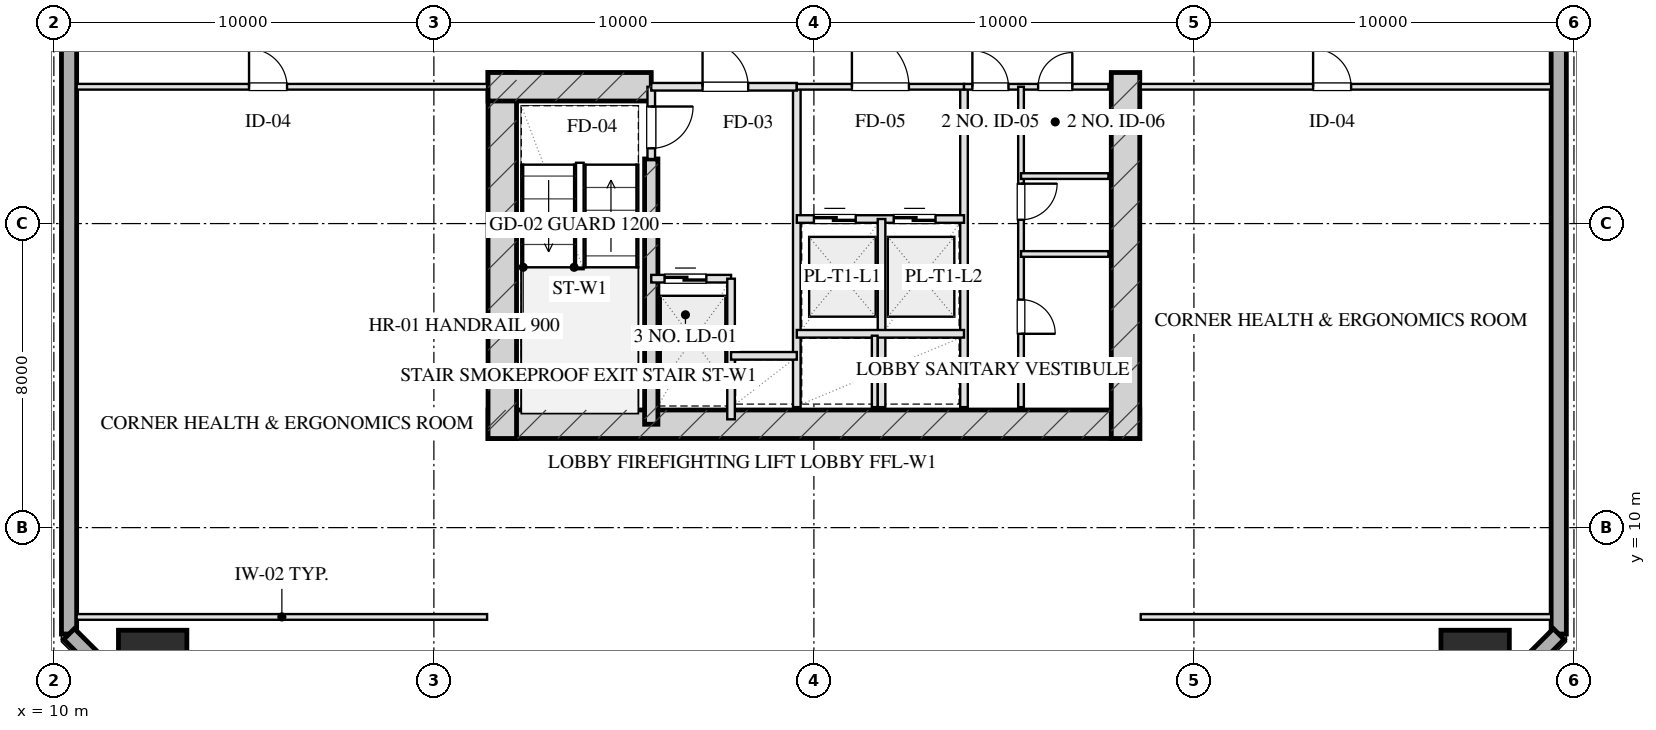
"""IFC4 building model, lengths in metres.
Left out: names, types, materials, properties, quantities, classifications, styles, units other than length and angle.
Written with IfcOpenShell. Run it as: python <this file> out.ifc"""

import sys

from ifc_helpers import new_model, si_unit, direction, frame, frame_2d, origin, origin_2d, place, context, subcontext, project, spatial, rectangle, hollow_rectangle, extrude, element, fill, save


model = new_model("IFC4")
c1 = context("Model", 3, precision=1e-05, world=origin(), true_north=direction((0.0, 1.0)))
c2 = subcontext(c1, "Body", "Model", "MODEL_VIEW")
j1 = project(units=[si_unit("LENGTHUNIT", "METRE"), si_unit("PLANEANGLEUNIT", "RADIAN")], contexts=[c1])
p1 = place(None, origin())
s1 = spatial("IfcSite", under=j1, at=p1, CompositionType="ELEMENT")
p2 = place(p1, origin())
s2 = spatial("IfcBuilding", under=s1, at=p2, CompositionType="ELEMENT")
p3 = place(p2, frame((0.0, 0.0, 85.1)))
s3 = spatial("IfcBuildingStorey", under=s2, at=p3, CompositionType="ELEMENT", Elevation=85.1)
p4 = place(p3, frame((21.425, 12.72, 0.0), z_axis=(0.0, 0.0, 1.0), x_axis=(1.0, 0.0, 0.0)))
e1 = element("IfcWall", 1, at=p4, inside=s3, PredefinedType="SHEAR", context=c2, shape_type="SweptSolid", body=[
    extrude(rectangle(XDim=17.15, YDim=0.75, at=frame_2d((8.575, 0.0))), origin(), (0.0, 0.0, 1.0), 3.45),
])
for number, where, z_axis, x_axis in (
    (2, (21.8, 21.975, 0.0), (0.0, 0.0, 1.0), (0.0, -1.0, 0.0)),
    (3, (38.2, 21.975, 0.0), (0.0, 0.0, 1.0), (0.0, -1.0, 0.0)),
):
    element("IfcWall", number, at=place(p3, frame(where, z_axis=z_axis, x_axis=x_axis)), inside=s3, PredefinedType="SHEAR", context=c2, shape_type="SweptSolid", body=[
        extrude(rectangle(XDim=9.63, YDim=0.75, at=frame_2d((4.815, 0.0))), origin(), (0.0, 0.0, 1.0), 3.45),
    ])
p5 = place(p3, frame((25.72, 19.7, 0.0), z_axis=(0.0, 0.0, 1.0), x_axis=(0.0, -1.0, 0.0)))
e4 = element("IfcWall", 4, at=p5, inside=s3, PredefinedType="SHEAR", context=c2, shape_type="SweptSolid", body=[
    extrude(rectangle(XDim=6.98, YDim=0.35, at=frame_2d((3.49, 0.0))), origin(), (0.0, 0.0, 1.0), 3.45),
])
p6 = place(p3, frame((21.425, 21.6, 0.0), z_axis=(0.0, 0.0, 1.0), x_axis=(1.0, 0.0, 0.0)))
e5 = element("IfcWall", 5, at=p6, inside=s3, PredefinedType="SHEAR", context=c2, shape_type="SweptSolid", body=[
    extrude(rectangle(XDim=4.295, YDim=0.75, at=frame_2d((2.147, 0.0))), origin(), (0.0, 0.0, 1.0), 3.45),
])
for number, where, z_axis, x_axis in (
    (6, (12.6, 6.4, 0.0), (0.0, 0.0, 1.0), (1.0, 0.0, 0.0)),
    (7, (47.4, 6.4, 0.0), (0.0, 0.0, 1.0), (1.0, 0.0, 0.0)),
):
    element("IfcColumn", number, at=place(p3, frame(where, z_axis=z_axis, x_axis=x_axis)), inside=s3, PredefinedType="COLUMN", context=c2, shape_type="SweptSolid", body=[
        extrude(hollow_rectangle(XDim=1.8, YDim=1.8, WallThickness=0.06, at=origin_2d()), origin(), (0.0, 0.0, 1.0), 3.451),
    ])
p7 = place(p3, frame((10.4, 7.2, 0.0), z_axis=(0.0, 0.0, 1.0), x_axis=(0.0, 1.0, 0.0)))
e8 = element("IfcWall", 8, at=p7, inside=s3, PredefinedType="SOLIDWALL", context=c2, shape_type="SweptSolid", body=[
    extrude(rectangle(XDim=53.6, YDim=0.4, at=frame_2d((26.8, 0.0))), origin(), (0.0, 0.0, 1.0), 2.61),
])
p8 = place(p3, frame((49.6, 60.8, 0.0), z_axis=(0.0, 0.0, 1.0), x_axis=(0.0, -1.0, 0.0)))
e9 = element("IfcWall", 9, at=p8, inside=s3, PredefinedType="SOLIDWALL", context=c2, shape_type="SweptSolid", body=[
    extrude(rectangle(XDim=53.6, YDim=0.4, at=frame_2d((26.8, 0.0))), origin(), (0.0, 0.0, 1.0), 2.61),
])
p9 = place(p8, frame((32.0, 0.0, 0.75)))
e10 = element("IfcOpeningElement", 10, at=p9, cuts=e9, PredefinedType="OPENING", context=c2, shape_type="SweptSolid", body=[
    extrude(rectangle(XDim=2.4, YDim=1.46, at=frame_2d((1.2, 0.73))), frame((0.0, 0.21, 0.0), z_axis=(0.0, -1.0, 0.0), x_axis=(1.0, 0.0, 0.0)), (0.0, 0.0, 1.0), 0.42),
])
p10 = place(p8, frame((23.0, 0.0, 0.75)))
e11 = element("IfcOpeningElement", 11, at=p10, cuts=e9, PredefinedType="OPENING", context=c2, shape_type="SweptSolid", body=[
    extrude(rectangle(XDim=2.4, YDim=1.46, at=frame_2d((1.2, 0.73))), frame((0.0, 0.21, 0.0), z_axis=(0.0, -1.0, 0.0), x_axis=(1.0, 0.0, 0.0)), (0.0, 0.0, 1.0), 0.42),
])
for number, where, z_axis, x_axis in (
    (12, (49.6, 7.2, 0.0), (0.0, 0.0, 1.0), (-0.707, -0.707, 0.0)),
    (13, (13.4, 4.2, 0.0), (0.0, 0.0, 1.0), (-0.707, 0.707, 0.0)),
):
    element("IfcWall", number, at=place(p3, frame(where, z_axis=z_axis, x_axis=x_axis)), inside=s3, PredefinedType="SOLIDWALL", context=c2, shape_type="SweptSolid", body=[
        extrude(rectangle(XDim=4.243, YDim=0.4, at=frame_2d((2.121, 0.0))), origin(), (0.0, 0.0, 1.0), 2.61),
    ])
p11 = place(p3, frame((25.72, 21.6, 0.0), z_axis=(0.0, 0.0, 1.0), x_axis=(0.0, -1.0, 0.0)))
e14 = element("IfcWall", 14, at=p11, inside=s3, PredefinedType="PARTITIONING", context=c2, shape_type="SweptSolid", body=[
    extrude(rectangle(XDim=1.9, YDim=0.2, at=frame_2d((0.95, 0.0))), origin(), (0.0, 0.0, 1.0), 3.175),
])
p12 = place(p11, frame((0.52, 0.0, 0.0)))
e15 = element("IfcOpeningElement", 15, at=p12, cuts=e14, PredefinedType="OPENING", context=c2, shape_type="SweptSolid", body=[
    extrude(rectangle(XDim=1.1, YDim=2.05, at=frame_2d((0.55, 1.025))), frame((0.0, 0.11, 0.0), z_axis=(0.0, -1.0, 0.0), x_axis=(1.0, 0.0, 0.0)), (0.0, 0.0, 1.0), 0.22),
])
p13 = place(p3, frame((29.55, 21.6, 0.0), z_axis=(0.0, 0.0, 1.0), x_axis=(0.0, -1.0, 0.0)))
e16 = element("IfcWall", 16, at=p13, inside=s3, PredefinedType="PARTITIONING", context=c2, shape_type="SweptSolid", body=[
    extrude(rectangle(XDim=8.43, YDim=0.2, at=frame_2d((4.215, 0.0))), origin(), (0.0, 0.0, 1.0), 3.175),
])
p14 = place(p3, frame((25.72, 21.6, 0.0), z_axis=(0.0, 0.0, 1.0), x_axis=(1.0, 0.0, 0.0)))
e17 = element("IfcWall", 17, at=p14, inside=s3, PredefinedType="PARTITIONING", context=c2, shape_type="SweptSolid", body=[
    extrude(rectangle(XDim=3.83, YDim=0.2, at=frame_2d((1.915, 0.0))), origin(), (0.0, 0.0, 1.0), 3.175),
])
p15 = place(p14, frame((1.35, 0.0, 0.0)))
e18 = element("IfcOpeningElement", 18, at=p15, cuts=e17, PredefinedType="OPENING", context=c2, shape_type="SweptSolid", body=[
    extrude(rectangle(XDim=1.2, YDim=2.05, at=frame_2d((0.6, 1.025))), frame((0.0, 0.11, 0.0), z_axis=(0.0, -1.0, 0.0), x_axis=(1.0, 0.0, 0.0)), (0.0, 0.0, 1.0), 0.22),
])
p16 = place(p3, frame((25.72, 16.55, 0.0), z_axis=(0.0, 0.0, 1.0), x_axis=(1.0, 0.0, 0.0)))
e19 = element("IfcWall", 19, at=p16, inside=s3, PredefinedType="PARTITIONING", context=c2, shape_type="SweptSolid", body=[
    extrude(rectangle(XDim=2.1, YDim=0.2, at=frame_2d((1.05, 0.0))), origin(), (0.0, 0.0, 1.0), 3.175),
])
p17 = place(p16, frame((0.35, 0.0, 0.0)))
e20 = element("IfcOpeningElement", 20, at=p17, cuts=e19, PredefinedType="OPENING", context=c2, shape_type="SweptSolid", body=[
    extrude(rectangle(XDim=1.1, YDim=2.05, at=frame_2d((0.55, 1.025))), frame((0.0, 0.11, 0.0), z_axis=(0.0, -1.0, 0.0), x_axis=(1.0, 0.0, 0.0)), (0.0, 0.0, 1.0), 0.22),
])
p18 = place(p3, frame((27.82, 16.55, 0.0), z_axis=(0.0, 0.0, 1.0), x_axis=(0.0, -1.0, 0.0)))
e21 = element("IfcWall", 21, at=p18, inside=s3, PredefinedType="PARTITIONING", context=c2, shape_type="SweptSolid", body=[
    extrude(rectangle(XDim=3.7, YDim=0.2, at=frame_2d((1.85, 0.0))), origin(), (0.0, 0.0, 1.0), 3.175),
])
p19 = place(p3, frame((27.82, 14.52, 0.0), z_axis=(0.0, 0.0, 1.0), x_axis=(1.0, 0.0, 0.0)))
e22 = element("IfcWall", 22, at=p19, inside=s3, PredefinedType="PARTITIONING", context=c2, shape_type="SweptSolid", body=[
    extrude(rectangle(XDim=1.73, YDim=0.2, at=frame_2d((0.865, 0.0))), origin(), (0.0, 0.0, 1.0), 3.175),
])
p20 = place(p3, frame((33.95, 21.6, 0.0), z_axis=(0.0, 0.0, 1.0), x_axis=(0.0, -1.0, 0.0)))
e23 = element("IfcWall", 23, at=p20, inside=s3, PredefinedType="PARTITIONING", context=c2, shape_type="SweptSolid", body=[
    extrude(rectangle(XDim=8.43, YDim=0.2, at=frame_2d((4.215, 0.0))), origin(), (0.0, 0.0, 1.0), 3.175),
])
p21 = place(p3, frame((29.55, 21.6, 0.0), z_axis=(0.0, 0.0, 1.0), x_axis=(1.0, 0.0, 0.0)))
e24 = element("IfcWall", 24, at=p21, inside=s3, PredefinedType="PARTITIONING", context=c2, shape_type="SweptSolid", body=[
    extrude(rectangle(XDim=4.4, YDim=0.15, at=frame_2d((2.2, 0.0))), origin(), (0.0, 0.0, 1.0), 3.175),
])
p22 = place(p21, frame((1.45, 0.0, 0.0)))
e25 = element("IfcOpeningElement", 25, at=p22, cuts=e24, PredefinedType="OPENING", context=c2, shape_type="SweptSolid", body=[
    extrude(rectangle(XDim=1.5, YDim=2.05, at=frame_2d((0.75, 1.025))), frame((0.0, 0.085, 0.0), z_axis=(0.0, -1.0, 0.0), x_axis=(1.0, 0.0, 0.0)), (0.0, 0.0, 1.0), 0.17),
])
p23 = place(p3, frame((29.55, 18.12, 0.0), z_axis=(0.0, 0.0, 1.0), x_axis=(1.0, 0.0, 0.0)))
e26 = element("IfcWall", 26, at=p23, inside=s3, PredefinedType="PARTITIONING", context=c2, shape_type="SweptSolid", body=[
    extrude(rectangle(XDim=4.4, YDim=0.2, at=frame_2d((2.2, 0.0))), origin(), (0.0, 0.0, 1.0), 3.175),
])
p24 = place(p23, frame((0.45, 0.0, 0.0)))
e27 = element("IfcOpeningElement", 27, at=p24, cuts=e26, PredefinedType="OPENING", context=c2, shape_type="SweptSolid", body=[
    extrude(rectangle(XDim=1.1, YDim=2.05, at=frame_2d((0.55, 1.025))), frame((0.0, 0.11, 0.0), z_axis=(0.0, -1.0, 0.0), x_axis=(1.0, 0.0, 0.0)), (0.0, 0.0, 1.0), 0.22),
])
p25 = place(p23, frame((2.55, 0.0, 0.0)))
e28 = element("IfcOpeningElement", 28, at=p25, cuts=e26, PredefinedType="OPENING", context=c2, shape_type="SweptSolid", body=[
    extrude(rectangle(XDim=1.1, YDim=2.05, at=frame_2d((0.55, 1.025))), frame((0.0, 0.11, 0.0), z_axis=(0.0, -1.0, 0.0), x_axis=(1.0, 0.0, 0.0)), (0.0, 0.0, 1.0), 0.22),
])
p26 = place(p3, frame((31.78, 18.12, 0.0), z_axis=(0.0, 0.0, 1.0), x_axis=(0.0, -1.0, 0.0)))
e29 = element("IfcWall", 29, at=p26, inside=s3, PredefinedType="PARTITIONING", context=c2, shape_type="SweptSolid", body=[
    extrude(rectangle(XDim=4.95, YDim=0.2, at=frame_2d((2.475, 0.0))), origin(), (0.0, 0.0, 1.0), 3.175),
])
p27 = place(p3, frame((29.55, 15.1, 0.0), z_axis=(0.0, 0.0, 1.0), x_axis=(1.0, 0.0, 0.0)))
e30 = element("IfcWall", 30, at=p27, inside=s3, PredefinedType="PARTITIONING", context=c2, shape_type="SweptSolid", body=[
    extrude(rectangle(XDim=4.4, YDim=0.2, at=frame_2d((2.2, 0.0))), origin(), (0.0, 0.0, 1.0), 3.175),
])
p28 = place(p3, frame((31.6, 15.05, 0.0), z_axis=(0.0, 0.0, 1.0), x_axis=(0.0, -1.0, 0.0)))
e31 = element("IfcWall", 31, at=p28, inside=s3, PredefinedType="PARTITIONING", context=c2, shape_type="SweptSolid", body=[
    extrude(rectangle(XDim=1.88, YDim=0.15, at=frame_2d((0.94, 0.0))), origin(), (0.0, 0.0, 1.0), 3.175),
])
p29 = place(p3, frame((33.95, 21.6, 0.0), z_axis=(0.0, 0.0, 1.0), x_axis=(1.0, 0.0, 0.0)))
e32 = element("IfcWall", 32, at=p29, inside=s3, PredefinedType="PARTITIONING", context=c2, shape_type="SweptSolid", body=[
    extrude(rectangle(XDim=3.8, YDim=0.15, at=frame_2d((1.9, 0.0))), origin(), (0.0, 0.0, 1.0), 3.175),
])
p30 = place(p29, frame((0.22, 0.0, 0.0)))
e33 = element("IfcOpeningElement", 33, at=p30, cuts=e32, PredefinedType="OPENING", context=c2, shape_type="SweptSolid", body=[
    extrude(rectangle(XDim=0.95, YDim=2.05, at=frame_2d((0.475, 1.025))), frame((0.0, 0.085, 0.0), z_axis=(0.0, -1.0, 0.0), x_axis=(1.0, 0.0, 0.0)), (0.0, 0.0, 1.0), 0.17),
])
p31 = place(p29, frame((1.95, 0.0, 0.0)))
e34 = element("IfcOpeningElement", 34, at=p31, cuts=e32, PredefinedType="OPENING", context=c2, shape_type="SweptSolid", body=[
    extrude(rectangle(XDim=0.9, YDim=2.05, at=frame_2d((0.45, 1.025))), frame((0.0, 0.085, 0.0), z_axis=(0.0, -1.0, 0.0), x_axis=(1.0, 0.0, 0.0)), (0.0, 0.0, 1.0), 0.17),
])
p32 = place(p3, frame((35.45, 21.6, 0.0), z_axis=(0.0, 0.0, 1.0), x_axis=(0.0, -1.0, 0.0)))
e35 = element("IfcWall", 35, at=p32, inside=s3, PredefinedType="PARTITIONING", context=c2, shape_type="SweptSolid", body=[
    extrude(rectangle(XDim=8.43, YDim=0.15, at=frame_2d((4.215, 0.0))), origin(), (0.0, 0.0, 1.0), 2.815),
])
p33 = place(p32, frame((2.55, 0.0, 0.0)))
e36 = element("IfcOpeningElement", 36, at=p33, cuts=e35, PredefinedType="OPENING", context=c2, shape_type="SweptSolid", body=[
    extrude(rectangle(XDim=0.95, YDim=2.05, at=frame_2d((0.475, 1.025))), frame((0.0, 0.085, 0.0), z_axis=(0.0, -1.0, 0.0), x_axis=(1.0, 0.0, 0.0)), (0.0, 0.0, 1.0), 0.17),
])
p34 = place(p32, frame((5.6, 0.0, 0.0)))
e37 = element("IfcOpeningElement", 37, at=p34, cuts=e35, PredefinedType="OPENING", context=c2, shape_type="SweptSolid", body=[
    extrude(rectangle(XDim=0.9, YDim=2.05, at=frame_2d((0.45, 1.025))), frame((0.0, 0.085, 0.0), z_axis=(0.0, -1.0, 0.0), x_axis=(1.0, 0.0, 0.0)), (0.0, 0.0, 1.0), 0.17),
])
for number, where, z_axis, x_axis in (
    (38, (35.45, 17.2, 0.0), (0.0, 0.0, 1.0), (1.0, 0.0, 0.0)),
    (39, (35.45, 19.25, 0.0), (0.0, 0.0, 1.0), (1.0, 0.0, 0.0)),
):
    element("IfcWall", number, at=place(p3, frame(where, z_axis=z_axis, x_axis=x_axis)), inside=s3, PredefinedType="PARTITIONING", context=c2, shape_type="SweptSolid", body=[
        extrude(rectangle(XDim=2.3, YDim=0.15, at=frame_2d((1.15, 0.0))), origin(), (0.0, 0.0, 1.0), 3.175),
    ])
p35 = place(p3, frame((10.6, 7.65, 0.0), z_axis=(0.0, 0.0, 1.0), x_axis=(1.0, 0.0, 0.0)))
e40 = element("IfcWall", 40, at=p35, inside=s3, PredefinedType="PARTITIONING", context=c2, shape_type="SweptSolid", body=[
    extrude(rectangle(XDim=10.8, YDim=0.15, at=frame_2d((5.4, 0.0))), origin(), (0.0, 0.0, 1.0), 3.175),
])
p36 = place(p3, frame((10.6, 21.6, 0.0), z_axis=(0.0, 0.0, 1.0), x_axis=(1.0, 0.0, 0.0)))
e41 = element("IfcWall", 41, at=p36, inside=s3, PredefinedType="PARTITIONING", context=c2, shape_type="SweptSolid", body=[
    extrude(rectangle(XDim=10.8, YDim=0.15, at=frame_2d((5.4, 0.0))), origin(), (0.0, 0.0, 1.0), 3.175),
])
p37 = place(p36, frame((4.536, 0.0, 0.0)))
e42 = element("IfcOpeningElement", 42, at=p37, cuts=e41, PredefinedType="OPENING", context=c2, shape_type="SweptSolid", body=[
    extrude(rectangle(XDim=1.0, YDim=2.05, at=frame_2d((0.5, 1.025))), frame((0.0, 0.085, 0.0), z_axis=(0.0, -1.0, 0.0), x_axis=(1.0, 0.0, 0.0)), (0.0, 0.0, 1.0), 0.17),
])
p38 = place(p3, frame((38.6, 7.65, 0.0), z_axis=(0.0, 0.0, 1.0), x_axis=(1.0, 0.0, 0.0)))
e43 = element("IfcWall", 43, at=p38, inside=s3, PredefinedType="PARTITIONING", context=c2, shape_type="SweptSolid", body=[
    extrude(rectangle(XDim=10.8, YDim=0.15, at=frame_2d((5.4, 0.0))), origin(), (0.0, 0.0, 1.0), 3.175),
])
p39 = place(p3, frame((38.6, 21.6, 0.0), z_axis=(0.0, 0.0, 1.0), x_axis=(1.0, 0.0, 0.0)))
e44 = element("IfcWall", 44, at=p39, inside=s3, PredefinedType="PARTITIONING", context=c2, shape_type="SweptSolid", body=[
    extrude(rectangle(XDim=10.8, YDim=0.15, at=frame_2d((5.4, 0.0))), origin(), (0.0, 0.0, 1.0), 3.175),
])
p40 = place(p39, frame((4.536, 0.0, 0.0)))
e45 = element("IfcOpeningElement", 45, at=p40, cuts=e44, PredefinedType="OPENING", context=c2, shape_type="SweptSolid", body=[
    extrude(rectangle(XDim=1.0, YDim=2.05, at=frame_2d((0.5, 1.025))), frame((0.0, 0.085, 0.0), z_axis=(0.0, -1.0, 0.0), x_axis=(1.0, 0.0, 0.0)), (0.0, 0.0, 1.0), 0.17),
])
p41 = place(p12, origin())
e46 = element("IfcDoor", 46, at=p41, inside=s3, OperationType="SINGLE_SWING_LEFT", PredefinedType="DOOR", context=c2, shape_type="SweptSolid", body=[
    extrude(rectangle(XDim=1.1, YDim=2.05, at=frame_2d((0.55, 1.025))), frame((0.0, 0.025, 0.0), z_axis=(0.0, -1.0, 0.0), x_axis=(1.0, 0.0, 0.0)), (0.0, 0.0, 1.0), 0.05),
])
fill(e15, e46)
p42 = place(p15, origin())
e47 = element("IfcDoor", 47, at=p42, inside=s3, OperationType="SINGLE_SWING_LEFT", PredefinedType="DOOR", context=c2, shape_type="SweptSolid", body=[
    extrude(rectangle(XDim=1.2, YDim=2.05, at=frame_2d((0.6, 1.025))), frame((0.0, 0.025, 0.0), z_axis=(0.0, -1.0, 0.0), x_axis=(1.0, 0.0, 0.0)), (0.0, 0.0, 1.0), 0.05),
])
fill(e18, e47)
p43 = place(p17, origin())
e48 = element("IfcDoor", 48, at=p43, inside=s3, OperationType="DOUBLE_DOOR_SLIDING", PredefinedType="DOOR", context=c2, shape_type="SweptSolid", body=[
    extrude(rectangle(XDim=1.1, YDim=2.05, at=frame_2d((0.55, 1.025))), frame((0.0, 0.025, 0.0), z_axis=(0.0, -1.0, 0.0), x_axis=(1.0, 0.0, 0.0)), (0.0, 0.0, 1.0), 0.05),
])
fill(e20, e48)
p44 = place(p22, origin())
e49 = element("IfcDoor", 49, at=p44, inside=s3, OperationType="SINGLE_SWING_LEFT", PredefinedType="DOOR", context=c2, shape_type="SweptSolid", body=[
    extrude(rectangle(XDim=1.5, YDim=2.05, at=frame_2d((0.75, 1.025))), frame((0.0, 0.025, 0.0), z_axis=(0.0, -1.0, 0.0), x_axis=(1.0, 0.0, 0.0)), (0.0, 0.0, 1.0), 0.05),
])
fill(e25, e49)
p45 = place(p24, origin())
e50 = element("IfcDoor", 50, at=p45, inside=s3, OperationType="DOUBLE_DOOR_SLIDING", PredefinedType="DOOR", context=c2, shape_type="SweptSolid", body=[
    extrude(rectangle(XDim=1.1, YDim=2.05, at=frame_2d((0.55, 1.025))), frame((0.0, 0.025, 0.0), z_axis=(0.0, -1.0, 0.0), x_axis=(1.0, 0.0, 0.0)), (0.0, 0.0, 1.0), 0.05),
])
fill(e27, e50)
p46 = place(p25, origin())
e51 = element("IfcDoor", 51, at=p46, inside=s3, OperationType="DOUBLE_DOOR_SLIDING", PredefinedType="DOOR", context=c2, shape_type="SweptSolid", body=[
    extrude(rectangle(XDim=1.1, YDim=2.05, at=frame_2d((0.55, 1.025))), frame((0.0, 0.025, 0.0), z_axis=(0.0, -1.0, 0.0), x_axis=(1.0, 0.0, 0.0)), (0.0, 0.0, 1.0), 0.05),
])
fill(e28, e51)
p47 = place(p30, origin())
e52 = element("IfcDoor", 52, at=p47, inside=s3, OperationType="SINGLE_SWING_LEFT", PredefinedType="DOOR", context=c2, shape_type="SweptSolid", body=[
    extrude(rectangle(XDim=0.95, YDim=2.05, at=frame_2d((0.475, 1.025))), frame((0.0, 0.025, 0.0), z_axis=(0.0, -1.0, 0.0), x_axis=(1.0, 0.0, 0.0)), (0.0, 0.0, 1.0), 0.05),
])
fill(e33, e52)
p48 = place(p31, origin())
e53 = element("IfcDoor", 53, at=p48, inside=s3, OperationType="SINGLE_SWING_RIGHT", PredefinedType="DOOR", context=c2, shape_type="SweptSolid", body=[
    extrude(rectangle(XDim=0.9, YDim=2.05, at=frame_2d((0.45, 1.025))), frame((0.0, 0.025, 0.0), z_axis=(0.0, -1.0, 0.0), x_axis=(1.0, 0.0, 0.0)), (0.0, 0.0, 1.0), 0.05),
])
fill(e34, e53)
p49 = place(p33, origin())
e54 = element("IfcDoor", 54, at=p49, inside=s3, OperationType="SINGLE_SWING_LEFT", PredefinedType="DOOR", context=c2, shape_type="SweptSolid", body=[
    extrude(rectangle(XDim=0.95, YDim=2.05, at=frame_2d((0.475, 1.025))), frame((0.0, 0.025, 0.0), z_axis=(0.0, -1.0, 0.0), x_axis=(1.0, 0.0, 0.0)), (0.0, 0.0, 1.0), 0.05),
])
fill(e36, e54)
p50 = place(p34, origin())
e55 = element("IfcDoor", 55, at=p50, inside=s3, OperationType="SINGLE_SWING_RIGHT", PredefinedType="DOOR", context=c2, shape_type="SweptSolid", body=[
    extrude(rectangle(XDim=0.9, YDim=2.05, at=frame_2d((0.45, 1.025))), frame((0.0, 0.025, 0.0), z_axis=(0.0, -1.0, 0.0), x_axis=(1.0, 0.0, 0.0)), (0.0, 0.0, 1.0), 0.05),
])
fill(e37, e55)
p51 = place(p37, origin())
e56 = element("IfcDoor", 56, at=p51, inside=s3, OperationType="SINGLE_SWING_LEFT", PredefinedType="DOOR", context=c2, shape_type="SweptSolid", body=[
    extrude(rectangle(XDim=1.0, YDim=2.05, at=frame_2d((0.5, 1.025))), frame((0.0, 0.025, 0.0), z_axis=(0.0, -1.0, 0.0), x_axis=(1.0, 0.0, 0.0)), (0.0, 0.0, 1.0), 0.05),
])
fill(e42, e56)
p52 = place(p40, origin())
e57 = element("IfcDoor", 57, at=p52, inside=s3, OperationType="SINGLE_SWING_LEFT", PredefinedType="DOOR", context=c2, shape_type="SweptSolid", body=[
    extrude(rectangle(XDim=1.0, YDim=2.05, at=frame_2d((0.5, 1.025))), frame((0.0, 0.025, 0.0), z_axis=(0.0, -1.0, 0.0), x_axis=(1.0, 0.0, 0.0)), (0.0, 0.0, 1.0), 0.05),
])
fill(e45, e57)
save(model, sys.argv[1])
